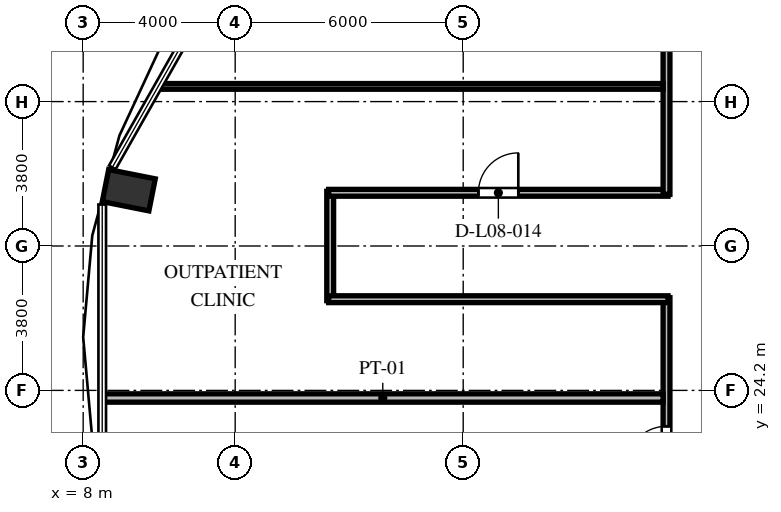
"""IFC4 building model, lengths in metres.
Left out: names, types, materials, properties, quantities, classifications, styles, units other than length and angle.
Written with IfcOpenShell. Run it as: python <this file> out.ifc"""

import sys

from ifc_helpers import new_model, si_unit, direction, frame, frame_2d, origin, origin_2d, place, context, subcontext, project, spatial, rectangle, extrude, element, fill, save


model = new_model("IFC4")
c1 = context("Model", 3, precision=1e-05, world=origin(), true_north=direction((0.0, 1.0)))
c2 = subcontext(c1, "Body", "Model", "MODEL_VIEW")
j1 = project(units=[si_unit("LENGTHUNIT", "METRE"), si_unit("PLANEANGLEUNIT", "RADIAN")], contexts=[c1])
p1 = place(None, origin())
s1 = spatial("IfcSite", under=j1, at=p1, CompositionType="ELEMENT")
p2 = place(p1, origin())
s2 = spatial("IfcBuilding", under=s1, at=p2, CompositionType="ELEMENT")
p3 = place(p2, frame((0.0, 0.0, 36.144)))
s3 = spatial("IfcBuildingStorey", under=s2, at=p3, CompositionType="ELEMENT", Elevation=36.144)
p4 = place(p3, frame((9.2, 29.468, 0.0), z_axis=(0.0, 0.0, 1.0), x_axis=(-0.980785280403, 0.195090322016, 0.0)))
e1 = element("IfcColumn", 1, at=p4, inside=s3, PredefinedType="COLUMN", context=c2, shape_type="SweptSolid", body=[
    extrude(rectangle(XDim=1.25, YDim=0.86, at=origin_2d()), origin(), (0.0, 0.0, 1.0), 3.648),
])
p5 = place(p3, frame((14.5, 26.56, 0.0), z_axis=(0.0, 0.0, 1.0), x_axis=(0.0, 1.0, 0.0)))
e2 = element("IfcWall", 2, at=p5, inside=s3, PredefinedType="PARTITIONING", context=c2, shape_type="SweptSolid", body=[
    extrude(rectangle(XDim=2.88, YDim=0.18, at=frame_2d((1.44, 0.0))), origin(), (0.0, 0.0, 1.0), 3.428),
])
p6 = place(p3, frame((14.46, 29.4, 0.0), z_axis=(0.0, 0.0, 1.0), x_axis=(1.0, 0.0, 0.0)))
e3 = element("IfcWall", 3, at=p6, inside=s3, PredefinedType="PARTITIONING", context=c2, shape_type="SweptSolid", body=[
    extrude(rectangle(XDim=8.93, YDim=0.18, at=frame_2d((4.465, 0.0))), origin(), (0.0, 0.0, 1.0), 3.428),
])
p7 = place(p6, frame((3.94, 0.0, 0.0)))
e4 = element("IfcOpeningElement", 4, at=p7, cuts=e3, PredefinedType="OPENING", context=c2, shape_type="SweptSolid", body=[
    extrude(rectangle(XDim=1.05, YDim=2.15, at=frame_2d((0.525, 1.075))), frame((0.0, 0.1, 0.0), z_axis=(0.0, -1.0, 0.0), x_axis=(1.0, 0.0, 0.0)), (0.0, 0.0, 1.0), 0.2),
])
p8 = place(p3, frame((23.35, 29.36, 0.0), z_axis=(0.0, 0.0, 1.0), x_axis=(0.0, 1.0, 0.0)))
e5 = element("IfcWall", 5, at=p8, inside=s3, PredefinedType="PARTITIONING", context=c2, shape_type="SweptSolid", body=[
    extrude(rectangle(XDim=9.43, YDim=0.18, at=frame_2d((4.715, 0.0))), origin(), (0.0, 0.0, 1.0), 3.428),
])
p9 = place(p8, frame((3.815, 0.0, 0.0)))
e6 = element("IfcOpeningElement", 6, at=p9, cuts=e5, PredefinedType="OPENING", context=c2, shape_type="SweptSolid", body=[
    extrude(rectangle(XDim=1.05, YDim=2.15, at=frame_2d((0.525, 1.075))), frame((0.0, 0.1, 0.0), z_axis=(0.0, -1.0, 0.0), x_axis=(1.0, 0.0, 0.0)), (0.0, 0.0, 1.0), 0.2),
])
p10 = place(p3, frame((23.35, 17.36, 0.0), z_axis=(0.0, 0.0, 1.0), x_axis=(0.0, 1.0, 0.0)))
e7 = element("IfcWall", 7, at=p10, inside=s3, PredefinedType="PARTITIONING", context=c2, shape_type="SweptSolid", body=[
    extrude(rectangle(XDim=9.28, YDim=0.18, at=frame_2d((4.64, 0.0))), origin(), (0.0, 0.0, 1.0), 3.428),
])
p11 = place(p10, frame((4.846, 0.0, 0.0)))
e8 = element("IfcOpeningElement", 8, at=p11, cuts=e7, PredefinedType="OPENING", context=c2, shape_type="SweptSolid", body=[
    extrude(rectangle(XDim=1.05, YDim=2.15, at=frame_2d((0.525, 1.075))), frame((0.0, 0.1, 0.0), z_axis=(0.0, -1.0, 0.0), x_axis=(1.0, 0.0, 0.0)), (0.0, 0.0, 1.0), 0.2),
])
p12 = place(p3, frame((23.39, 26.6, 0.0), z_axis=(0.0, 0.0, 1.0), x_axis=(-1.0, 0.0, 0.0)))
e9 = element("IfcWall", 9, at=p12, inside=s3, PredefinedType="PARTITIONING", context=c2, shape_type="SweptSolid", body=[
    extrude(rectangle(XDim=8.93, YDim=0.18, at=frame_2d((4.465, 0.0))), origin(), (0.0, 0.0, 1.0), 3.428),
])
p13 = place(p3, frame((8.508, 24.0, 0.0), z_axis=(0.0, 0.0, 1.0), x_axis=(1.0, 0.0, 0.0)))
e10 = element("IfcWall", 10, at=p13, inside=s3, PredefinedType="PARTITIONING", context=c2, shape_type="SweptSolid", body=[
    extrude(rectangle(XDim=14.752, YDim=0.22, at=frame_2d((7.376, 0.0))), origin(), (0.0, 0.0, 1.0), 3.428),
])
p14 = place(p3, frame((9.978, 32.2, 0.0), z_axis=(0.0, 0.0, 1.0), x_axis=(1.0, 0.0, 0.0)))
e11 = element("IfcWall", 11, at=p14, inside=s3, PredefinedType="PARTITIONING", context=c2, shape_type="SweptSolid", body=[
    extrude(rectangle(XDim=13.282, YDim=0.15, at=frame_2d((6.641, 0.0))), origin(), (0.0, 0.0, 1.0), 3.428),
])
p15 = place(p11, origin())
e12 = element("IfcDoor", 12, at=p15, inside=s3, OperationType="SINGLE_SWING_LEFT", PredefinedType="DOOR", context=c2, shape_type="SweptSolid", body=[
    extrude(rectangle(XDim=1.05, YDim=2.15, at=frame_2d((0.525, 1.075))), frame((0.0, 0.025, 0.0), z_axis=(0.0, -1.0, 0.0), x_axis=(1.0, 0.0, 0.0)), (0.0, 0.0, 1.0), 0.05),
])
fill(e8, e12)
p16 = place(p7, origin())
e13 = element("IfcDoor", 13, at=p16, inside=s3, OperationType="SINGLE_SWING_RIGHT", PredefinedType="DOOR", context=c2, shape_type="SweptSolid", body=[
    extrude(rectangle(XDim=1.05, YDim=2.15, at=frame_2d((0.525, 1.075))), frame((0.0, 0.025, 0.0), z_axis=(0.0, -1.0, 0.0), x_axis=(1.0, 0.0, 0.0)), (0.0, 0.0, 1.0), 0.05),
])
fill(e4, e13)
save(model, sys.argv[1])
